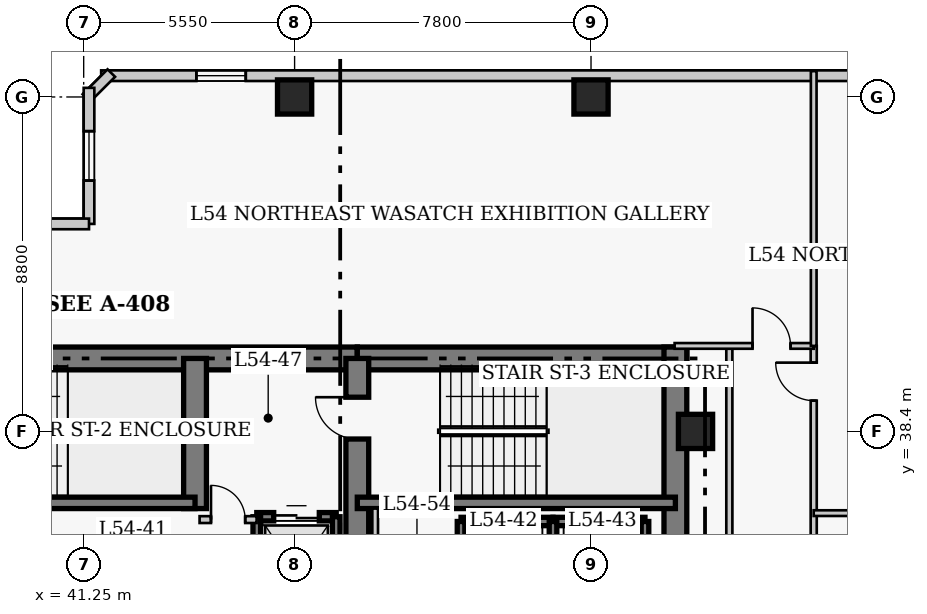
"""IFC4 building model, lengths in metres.
Left out: names, types, materials, properties, quantities, classifications, styles, units other than length and angle.
Written with IfcOpenShell. Run it as: python <this file> out.ifc"""

import sys

from ifc_helpers import new_model, si_unit, direction, frame, frame_2d, origin, origin_2d, place, context, subcontext, project, spatial, rectangle, extrude, element, fill, save


model = new_model("IFC4")
c1 = context("Model", 3, precision=1e-05, world=origin(), true_north=direction((0.0, 1.0)))
c2 = subcontext(c1, "Body", "Model", "MODEL_VIEW")
j1 = project(units=[si_unit("LENGTHUNIT", "METRE"), si_unit("PLANEANGLEUNIT", "RADIAN")], contexts=[c1])
p1 = place(None, origin())
s1 = spatial("IfcSite", under=j1, at=p1, CompositionType="ELEMENT")
p2 = place(p1, origin())
s2 = spatial("IfcBuilding", under=s1, at=p2, CompositionType="ELEMENT")
p3 = place(p2, frame((0.0, 0.0, 216.3)))
s3 = spatial("IfcBuildingStorey", under=s2, at=p3, CompositionType="ELEMENT", Elevation=216.3)
p4 = place(p3, frame((35.85, 40.32, 0.0), z_axis=(0.0, 0.0, 1.0), x_axis=(1.0, 0.0, 0.0)))
e1 = element("IfcWall", 1, at=p4, inside=s3, PredefinedType="SHEAR", context=c2, shape_type="SweptSolid", body=[
    extrude(rectangle(XDim=12.6, YDim=0.6, at=frame_2d((6.3, 0.0))), origin(), (0.0, 0.0, 1.0), 3.9),
])
p5 = place(p3, frame((48.45, 40.32, 0.0), z_axis=(0.0, 0.0, 1.0), x_axis=(1.0, 0.0, 0.0)))
e2 = element("IfcWall", 2, at=p5, inside=s3, PredefinedType="SHEAR", context=c2, shape_type="SweptSolid", body=[
    extrude(rectangle(XDim=8.67, YDim=0.6, at=frame_2d((4.335, 0.0))), origin(), (0.0, 0.0, 1.0), 3.9),
])
p6 = place(p3, frame((56.82, 27.05, 0.0), z_axis=(0.0, 0.0, 1.0), x_axis=(0.0, 1.0, 0.0)))
e3 = element("IfcWall", 3, at=p6, inside=s3, PredefinedType="SHEAR", context=c2, shape_type="SweptSolid", body=[
    extrude(rectangle(XDim=13.57, YDim=0.6, at=frame_2d((6.785, 0.0))), origin(), (0.0, 0.0, 1.0), 3.9),
])
p7 = place(p3, frame((44.18, 36.37, 0.0), z_axis=(0.0, 0.0, 1.0), x_axis=(0.0, 1.0, 0.0)))
e4 = element("IfcWall", 4, at=p7, inside=s3, PredefinedType="SHEAR", context=c2, shape_type="SweptSolid", body=[
    extrude(rectangle(XDim=3.95, YDim=0.6, at=frame_2d((1.975, 0.0))), origin(), (0.0, 0.0, 1.0), 3.9),
])
p8 = place(p3, frame((48.45, 32.45, 0.0), z_axis=(0.0, 0.0, 1.0), x_axis=(0.0, 1.0, 0.0)))
e5 = element("IfcWall", 5, at=p8, inside=s3, PredefinedType="SHEAR", context=c2, shape_type="SweptSolid", body=[
    extrude(rectangle(XDim=7.87, YDim=0.6, at=frame_2d((3.935, 0.0))), origin(), (0.0, 0.0, 1.0), 3.9),
])
p9 = place(p8, frame((5.75, 0.0, 0.0)))
e6 = element("IfcOpeningElement", 6, at=p9, cuts=e5, PredefinedType="OPENING", context=c2, shape_type="SweptSolid", body=[
    extrude(rectangle(XDim=1.1, YDim=2.15, at=frame_2d((0.55, 1.075))), frame((0.0, 0.31, 0.0), z_axis=(0.0, -1.0, 0.0), x_axis=(1.0, 0.0, 0.0)), (0.0, 0.0, 1.0), 0.62),
])
p10 = place(p3, frame((35.85, 36.52, 0.0), z_axis=(0.0, 0.0, 1.0), x_axis=(1.0, 0.0, 0.0)))
e7 = element("IfcWall", 7, at=p10, inside=s3, PredefinedType="SHEAR", context=c2, shape_type="SweptSolid", body=[
    extrude(rectangle(XDim=8.33, YDim=0.3, at=frame_2d((4.165, 0.0))), origin(), (0.0, 0.0, 1.0), 3.9),
])
p11 = place(p3, frame((48.45, 36.52, 0.0), z_axis=(0.0, 0.0, 1.0), x_axis=(1.0, 0.0, 0.0)))
e8 = element("IfcWall", 8, at=p11, inside=s3, PredefinedType="SHEAR", context=c2, shape_type="SweptSolid", body=[
    extrude(rectangle(XDim=8.37, YDim=0.3, at=frame_2d((4.185, 0.0))), origin(), (0.0, 0.0, 1.0), 3.9),
])
for number, where, z_axis, x_axis in (
    (9, (46.8, 47.2, 0.0), (0.0, 0.0, 1.0), (1.0, 0.0, 0.0)),
    (10, (54.6, 47.2, 0.0), (0.0, 0.0, 1.0), (1.0, 0.0, 0.0)),
    (11, (57.35, 38.4, 0.0), (0.0, 0.0, 1.0), (1.0, 0.0, 0.0)),
):
    element("IfcColumn", number, at=place(p3, frame(where, z_axis=z_axis, x_axis=x_axis)), inside=s3, PredefinedType="COLUMN", context=c2, shape_type="SweptSolid", body=[
        extrude(rectangle(XDim=0.9, YDim=0.9, at=origin_2d()), origin(), (0.0, 0.0, 1.0), 3.9),
    ])
p12 = place(p3, frame((67.54, 47.76, 0.0), z_axis=(0.0, 0.0, 1.0), x_axis=(-1.0, 0.0, 0.0)))
e12 = element("IfcWall", 12, at=p12, inside=s3, PredefinedType="SOLIDWALL", context=c2, shape_type="SweptSolid", body=[
    extrude(rectangle(XDim=25.83, YDim=0.28, at=frame_2d((12.915, 0.0))), origin(), (0.0, 0.0, 1.0), 3.65),
])
p13 = place(p12, frame((3.655, 0.0, 0.85)))
e13 = element("IfcOpeningElement", 13, at=p13, cuts=e12, PredefinedType="OPENING", context=c2, shape_type="SweptSolid", body=[
    extrude(rectangle(XDim=1.3, YDim=1.7, at=frame_2d((0.65, 0.85))), frame((0.0, 0.15, 0.0), z_axis=(0.0, -1.0, 0.0), x_axis=(1.0, 0.0, 0.0)), (0.0, 0.0, 1.0), 0.3),
])
p14 = place(p12, frame((22.025, 0.0, 0.85)))
e14 = element("IfcOpeningElement", 14, at=p14, cuts=e12, PredefinedType="OPENING", context=c2, shape_type="SweptSolid", body=[
    extrude(rectangle(XDim=1.3, YDim=1.7, at=frame_2d((0.65, 0.85))), frame((0.0, 0.15, 0.0), z_axis=(0.0, -1.0, 0.0), x_axis=(1.0, 0.0, 0.0)), (0.0, 0.0, 1.0), 0.3),
])
p15 = place(p3, frame((41.977, 47.829, 0.0), z_axis=(0.0, 0.0, 1.0), x_axis=(-0.706975312048, -0.707238225886, 0.0)))
e15 = element("IfcWall", 15, at=p15, inside=s3, PredefinedType="SOLIDWALL", context=c2, shape_type="SweptSolid", body=[
    extrude(rectangle(XDim=0.929, YDim=0.28, at=frame_2d((0.464, 0.0))), origin(), (0.0, 0.0, 1.0), 3.65),
])
p16 = place(p3, frame((41.39, 47.44, 0.0), z_axis=(0.0, 0.0, 1.0), x_axis=(0.0, -1.0, 0.0)))
e16 = element("IfcWall", 16, at=p16, inside=s3, PredefinedType="SOLIDWALL", context=c2, shape_type="SweptSolid", body=[
    extrude(rectangle(XDim=3.58, YDim=0.28, at=frame_2d((1.79, 0.0))), origin(), (0.0, 0.0, 1.0), 3.65),
])
p17 = place(p16, frame((1.14, 0.0, 0.85)))
e17 = element("IfcOpeningElement", 17, at=p17, cuts=e16, PredefinedType="OPENING", context=c2, shape_type="SweptSolid", body=[
    extrude(rectangle(XDim=1.3, YDim=1.7, at=frame_2d((0.65, 0.85))), frame((0.0, 0.15, 0.0), z_axis=(0.0, -1.0, 0.0), x_axis=(1.0, 0.0, 0.0)), (0.0, 0.0, 1.0), 0.3),
])
p18 = place(p3, frame((41.39, 43.86, 0.0), z_axis=(0.0, 0.0, 1.0), x_axis=(-1.0, 0.0, 0.0)))
e18 = element("IfcWall", 18, at=p18, inside=s3, PredefinedType="SOLIDWALL", context=c2, shape_type="SweptSolid", body=[
    extrude(rectangle(XDim=4.78, YDim=0.28, at=frame_2d((2.39, 0.0))), origin(), (0.0, 0.0, 1.0), 3.65),
])
p19 = place(p18, frame((1.74, 0.0, 0.85)))
e19 = element("IfcOpeningElement", 19, at=p19, cuts=e18, PredefinedType="OPENING", context=c2, shape_type="SweptSolid", body=[
    extrude(rectangle(XDim=1.3, YDim=1.7, at=frame_2d((0.65, 0.85))), frame((0.0, 0.15, 0.0), z_axis=(0.0, -1.0, 0.0), x_axis=(1.0, 0.0, 0.0)), (0.0, 0.0, 1.0), 0.3),
])
p20 = place(p3, frame((51.18, 36.03, 0.0), z_axis=(0.0, 0.0, 1.0), x_axis=(1.0, 0.0, 0.0)))
e20 = element("IfcWall", 20, at=p20, inside=s3, PredefinedType="SHEAR", context=c2, shape_type="SweptSolid", body=[
    extrude(rectangle(XDim=2.42, YDim=0.22, at=frame_2d((1.21, 0.0))), origin(), (0.0, 0.0, 1.0), 3.9),
])
p21 = place(p3, frame((51.18, 33.17, 0.0), z_axis=(0.0, 0.0, 1.0), x_axis=(0.0, 1.0, 0.0)))
e21 = element("IfcWall", 21, at=p21, inside=s3, PredefinedType="SHEAR", context=c2, shape_type="SweptSolid", body=[
    extrude(rectangle(XDim=2.86, YDim=0.2, at=frame_2d((1.43, 0.0))), origin(), (0.0, 0.0, 1.0), 3.9),
])
p22 = place(p3, frame((53.6, 36.03, 0.0), z_axis=(0.0, 0.0, 1.0), x_axis=(1.0, 0.0, 0.0)))
e22 = element("IfcWall", 22, at=p22, inside=s3, PredefinedType="SHEAR", context=c2, shape_type="SweptSolid", body=[
    extrude(rectangle(XDim=2.42, YDim=0.22, at=frame_2d((1.21, 0.0))), origin(), (0.0, 0.0, 1.0), 3.9),
])
for number, where, z_axis, x_axis in (
    (23, (53.6, 33.17, 0.0), (0.0, 0.0, 1.0), (0.0, 1.0, 0.0)),
    (24, (56.02, 33.17, 0.0), (0.0, 0.0, 1.0), (0.0, 1.0, 0.0)),
):
    element("IfcWall", number, at=place(p3, frame(where, z_axis=z_axis, x_axis=x_axis)), inside=s3, PredefinedType="SHEAR", context=c2, shape_type="SweptSolid", body=[
        extrude(rectangle(XDim=2.86, YDim=0.2, at=frame_2d((1.43, 0.0))), origin(), (0.0, 0.0, 1.0), 3.9),
    ])
p23 = place(p3, frame((45.805, 36.155, 0.0), z_axis=(0.0, 0.0, 1.0), x_axis=(1.0, 0.0, 0.0)))
e25 = element("IfcWall", 25, at=p23, inside=s3, PredefinedType="SHEAR", context=c2, shape_type="SweptSolid", body=[
    extrude(rectangle(XDim=2.09, YDim=0.22, at=frame_2d((1.045, 0.0))), origin(), (0.0, 0.0, 1.0), 3.9),
])
p24 = place(p23, frame((0.445, 0.0, 0.0)))
e26 = element("IfcOpeningElement", 26, at=p24, cuts=e25, PredefinedType="OPENING", context=c2, shape_type="SweptSolid", body=[
    extrude(rectangle(XDim=1.2, YDim=2.15, at=frame_2d((0.6, 1.075))), frame((0.0, 0.12, 0.0), z_axis=(0.0, -1.0, 0.0), x_axis=(1.0, 0.0, 0.0)), (0.0, 0.0, 1.0), 0.24),
])
p25 = place(p3, frame((45.805, 32.65, 0.0), z_axis=(0.0, 0.0, 1.0), x_axis=(0.0, 1.0, 0.0)))
e27 = element("IfcWall", 27, at=p25, inside=s3, PredefinedType="SHEAR", context=c2, shape_type="SweptSolid", body=[
    extrude(rectangle(XDim=3.505, YDim=0.2, at=frame_2d((1.752, 0.0))), origin(), (0.0, 0.0, 1.0), 3.9),
])
p26 = place(p3, frame((47.895, 33.245, 0.0), z_axis=(0.0, 0.0, 1.0), x_axis=(0.0, 1.0, 0.0)))
e28 = element("IfcWall", 28, at=p26, inside=s3, PredefinedType="SHEAR", context=c2, shape_type="SweptSolid", body=[
    extrude(rectangle(XDim=2.91, YDim=0.2, at=frame_2d((1.455, 0.0))), origin(), (0.0, 0.0, 1.0), 3.9),
])
p27 = place(p3, frame((44.3, 36.08, 0.0), z_axis=(0.0, 0.0, 1.0), x_axis=(1.0, 0.0, 0.0)))
e29 = element("IfcWall", 29, at=p27, inside=s3, PredefinedType="PARTITIONING", context=c2, shape_type="SweptSolid", body=[
    extrude(rectangle(XDim=1.5, YDim=0.18, at=frame_2d((0.75, 0.0))), origin(), (0.0, 0.0, 1.0), 3.65),
])
p28 = place(p27, frame((0.3, 0.0, 0.0)))
e30 = element("IfcOpeningElement", 30, at=p28, cuts=e29, PredefinedType="OPENING", context=c2, shape_type="SweptSolid", body=[
    extrude(rectangle(XDim=0.9, YDim=2.15, at=frame_2d((0.45, 1.075))), frame((0.0, 0.1, 0.0), z_axis=(0.0, -1.0, 0.0), x_axis=(1.0, 0.0, 0.0)), (0.0, 0.0, 1.0), 0.2),
])
p29 = place(p3, frame((48.92, 32.75, 0.0), z_axis=(0.0, 0.0, 1.0), x_axis=(0.0, 1.0, 0.0)))
e31 = element("IfcWall", 31, at=p29, inside=s3, PredefinedType="PARTITIONING", context=c2, shape_type="SweptSolid", body=[
    extrude(rectangle(XDim=3.62, YDim=0.15, at=frame_2d((1.81, 0.0))), origin(), (0.0, 0.0, 1.0), 3.65),
])
p30 = place(p3, frame((60.46, 11.95, 0.0), z_axis=(0.0, 0.0, 1.0), x_axis=(0.0, 1.0, 0.0)))
e32 = element("IfcWall", 32, at=p30, inside=s3, PredefinedType="PARTITIONING", context=c2, shape_type="SweptSolid", body=[
    extrude(rectangle(XDim=28.7, YDim=0.16, at=frame_2d((14.35, 0.0))), origin(), (0.0, 0.0, 1.0), 3.65),
])
p31 = place(p30, frame((0.46, 0.0, 0.0)))
e33 = element("IfcOpeningElement", 33, at=p31, cuts=e32, PredefinedType="OPENING", context=c2, shape_type="SweptSolid", body=[
    extrude(rectangle(XDim=0.95, YDim=2.1, at=frame_2d((0.475, 1.05))), frame((0.0, 0.09, 0.0), z_axis=(0.0, -1.0, 0.0), x_axis=(1.0, 0.0, 0.0)), (0.0, 0.0, 1.0), 0.18),
])
p32 = place(p30, frame((20.1, 0.0, 0.0)))
e34 = element("IfcOpeningElement", 34, at=p32, cuts=e32, PredefinedType="OPENING", context=c2, shape_type="SweptSolid", body=[
    extrude(rectangle(XDim=0.95, YDim=2.1, at=frame_2d((0.475, 1.05))), frame((0.0, 0.09, 0.0), z_axis=(0.0, -1.0, 0.0), x_axis=(1.0, 0.0, 0.0)), (0.0, 0.0, 1.0), 0.18),
])
p33 = place(p30, frame((27.26, 0.0, 0.0)))
e35 = element("IfcOpeningElement", 35, at=p33, cuts=e32, PredefinedType="OPENING", context=c2, shape_type="SweptSolid", body=[
    extrude(rectangle(XDim=1.0, YDim=2.15, at=frame_2d((0.5, 1.075))), frame((0.0, 0.09, 0.0), z_axis=(0.0, -1.0, 0.0), x_axis=(1.0, 0.0, 0.0)), (0.0, 0.0, 1.0), 0.18),
])
p34 = place(p3, frame((58.24, 18.51, 0.0), z_axis=(0.0, 0.0, 1.0), x_axis=(0.0, 1.0, 0.0)))
e36 = element("IfcWall", 36, at=p34, inside=s3, PredefinedType="PARTITIONING", context=c2, shape_type="SweptSolid", body=[
    extrude(rectangle(XDim=22.14, YDim=0.16, at=frame_2d((11.07, 0.0))), origin(), (0.0, 0.0, 1.0), 3.65),
])
p35 = place(p3, frame((56.8, 40.65, 0.0), z_axis=(0.0, 0.0, 1.0), x_axis=(1.0, 0.0, 0.0)))
e37 = element("IfcWall", 37, at=p35, inside=s3, PredefinedType="PARTITIONING", context=c2, shape_type="SweptSolid", body=[
    extrude(rectangle(XDim=3.66, YDim=0.15, at=frame_2d((1.83, 0.0))), origin(), (0.0, 0.0, 1.0), 3.65),
])
p36 = place(p35, frame((2.05, 0.0, 0.0)))
e38 = element("IfcOpeningElement", 38, at=p36, cuts=e37, PredefinedType="OPENING", context=c2, shape_type="SweptSolid", body=[
    extrude(rectangle(XDim=1.0, YDim=2.15, at=frame_2d((0.5, 1.075))), frame((0.0, 0.085, 0.0), z_axis=(0.0, -1.0, 0.0), x_axis=(1.0, 0.0, 0.0)), (0.0, 0.0, 1.0), 0.17),
])
p37 = place(p3, frame((60.46, 40.65, 0.0), z_axis=(0.0, 0.0, 1.0), x_axis=(0.0, 1.0, 0.0)))
e39 = element("IfcWall", 39, at=p37, inside=s3, PredefinedType="PARTITIONING", context=c2, shape_type="SweptSolid", body=[
    extrude(rectangle(XDim=7.23, YDim=0.15, at=frame_2d((3.615, 0.0))), origin(), (0.0, 0.0, 1.0), 3.65),
])
p38 = place(p3, frame((60.46, 36.25, 0.0), z_axis=(0.0, 0.0, 1.0), x_axis=(1.0, 0.0, 0.0)))
e40 = element("IfcWall", 40, at=p38, inside=s3, PredefinedType="PARTITIONING", context=c2, shape_type="SweptSolid", body=[
    extrude(rectangle(XDim=4.64, YDim=0.15, at=frame_2d((2.32, 0.0))), origin(), (0.0, 0.0, 1.0), 3.65),
])
p39 = place(p14, origin())
e41 = element("IfcWindow", 41, at=p39, inside=s3, PartitioningType="SINGLE_PANEL", PredefinedType="WINDOW", context=c2, shape_type="SweptSolid", body=[
    extrude(rectangle(XDim=1.3, YDim=1.7, at=frame_2d((0.65, 0.85))), frame((0.0, 0.03, 0.0), z_axis=(0.0, -1.0, 0.0), x_axis=(1.0, 0.0, 0.0)), (0.0, 0.0, 1.0), 0.06),
])
fill(e14, e41)
p40 = place(p17, origin())
e42 = element("IfcWindow", 42, at=p40, inside=s3, PartitioningType="SINGLE_PANEL", PredefinedType="WINDOW", context=c2, shape_type="SweptSolid", body=[
    extrude(rectangle(XDim=1.3, YDim=1.7, at=frame_2d((0.65, 0.85))), frame((0.0, 0.03, 0.0), z_axis=(0.0, -1.0, 0.0), x_axis=(1.0, 0.0, 0.0)), (0.0, 0.0, 1.0), 0.06),
])
fill(e17, e42)
p41 = place(p24, origin())
e43 = element("IfcDoor", 43, at=p41, inside=s3, OperationType="DOUBLE_DOOR_SLIDING", PredefinedType="DOOR", context=c2, shape_type="SweptSolid", body=[
    extrude(rectangle(XDim=1.2, YDim=2.15, at=frame_2d((0.6, 1.075))), frame((0.0, 0.025, 0.0), z_axis=(0.0, -1.0, 0.0), x_axis=(1.0, 0.0, 0.0)), (0.0, 0.0, 1.0), 0.05),
])
fill(e26, e43)
p42 = place(p28, origin())
e44 = element("IfcDoor", 44, at=p42, inside=s3, OperationType="SINGLE_SWING_LEFT", PredefinedType="DOOR", context=c2, shape_type="SweptSolid", body=[
    extrude(rectangle(XDim=0.9, YDim=2.15, at=frame_2d((0.45, 1.075))), frame((0.0, 0.025, 0.0), z_axis=(0.0, -1.0, 0.0), x_axis=(1.0, 0.0, 0.0)), (0.0, 0.0, 1.0), 0.05),
])
fill(e30, e44)
p43 = place(p36, origin())
e45 = element("IfcDoor", 45, at=p43, inside=s3, OperationType="SINGLE_SWING_LEFT", PredefinedType="DOOR", context=c2, shape_type="SweptSolid", body=[
    extrude(rectangle(XDim=1.0, YDim=2.15, at=frame_2d((0.5, 1.075))), frame((0.0, 0.025, 0.0), z_axis=(0.0, -1.0, 0.0), x_axis=(1.0, 0.0, 0.0)), (0.0, 0.0, 1.0), 0.05),
])
fill(e38, e45)
p44 = place(p33, origin())
e46 = element("IfcDoor", 46, at=p44, inside=s3, OperationType="SINGLE_SWING_RIGHT", PredefinedType="DOOR", context=c2, shape_type="SweptSolid", body=[
    extrude(rectangle(XDim=1.0, YDim=2.15, at=frame_2d((0.5, 1.075))), frame((0.0, 0.025, 0.0), z_axis=(0.0, -1.0, 0.0), x_axis=(1.0, 0.0, 0.0)), (0.0, 0.0, 1.0), 0.05),
])
fill(e35, e46)
p45 = place(p9, origin())
e47 = element("IfcDoor", 47, at=p45, inside=s3, OperationType="SINGLE_SWING_RIGHT", PredefinedType="DOOR", context=c2, shape_type="SweptSolid", body=[
    extrude(rectangle(XDim=1.1, YDim=2.15, at=frame_2d((0.55, 1.075))), frame((0.0, 0.025, 0.0), z_axis=(0.0, -1.0, 0.0), x_axis=(1.0, 0.0, 0.0)), (0.0, 0.0, 1.0), 0.05),
])
fill(e6, e47)
save(model, sys.argv[1])
